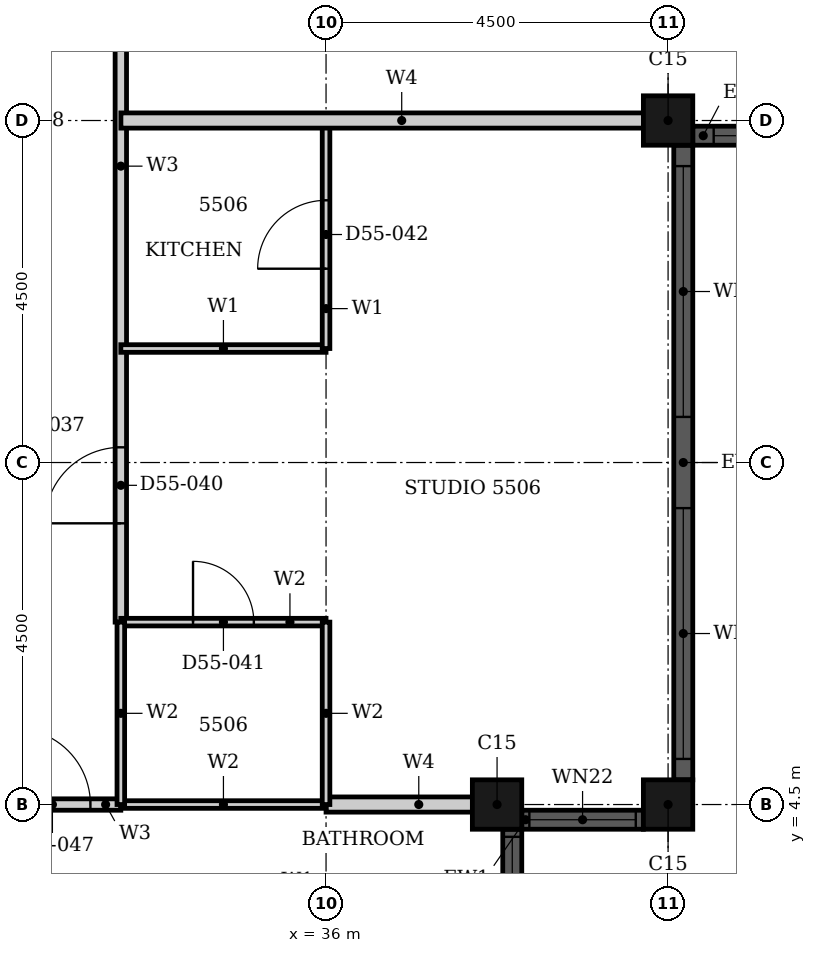
"""IFC4 building model, lengths in metres.
Left out: names, types, materials, properties, quantities, classifications, styles, units other than length and angle.
Written with IfcOpenShell. Run it as: python <this file> out.ifc"""

import sys

from ifc_helpers import new_model, si_unit, direction, frame, frame_2d, origin, origin_2d, place, context, subcontext, project, spatial, rectangle, hollow_rectangle, extrude, element, fill, save


model = new_model("IFC4")
c1 = context("Model", 3, precision=1e-05, world=origin(), true_north=direction((0.0, 1.0)))
c2 = subcontext(c1, "Body", "Model", "MODEL_VIEW")
j1 = project(units=[si_unit("LENGTHUNIT", "METRE"), si_unit("PLANEANGLEUNIT", "RADIAN")], contexts=[c1])
p1 = place(None, origin())
s1 = spatial("IfcSite", under=j1, at=p1, CompositionType="ELEMENT")
p2 = place(p1, origin())
s2 = spatial("IfcBuilding", under=s1, at=p2, CompositionType="ELEMENT")
p3 = place(p2, frame((0.0, 0.0, 218.3)))
s3 = spatial("IfcBuildingStorey", under=s2, at=p3, CompositionType="ELEMENT", Elevation=218.3)
for number, where, z_axis, x_axis in (
    (1, (40.5, 13.5, 0.0), (0.0, 0.0, 1.0), (1.0, 0.0, 0.0)),
    (2, (38.25, 4.5, 0.0), (0.0, 0.0, 1.0), (1.0, 0.0, 0.0)),
    (3, (40.5, 4.5, 0.0), (0.0, 0.0, 1.0), (1.0, 0.0, 0.0)),
):
    element("IfcColumn", number, at=place(p3, frame(where, z_axis=z_axis, x_axis=x_axis)), inside=s3, PredefinedType="COLUMN", context=c2, shape_type="SweptSolid", body=[
        extrude(hollow_rectangle(XDim=0.65, YDim=0.65, WallThickness=0.021, at=origin_2d()), origin(), (0.0, 0.0, 1.0), 3.7),
    ])
p4 = place(p3, frame((40.825, 13.3, 0.0), z_axis=(0.0, 0.0, 1.0), x_axis=(1.0, 0.0, 0.0)))
e4 = element("IfcWall", 4, at=p4, inside=s3, PredefinedType="SOLIDWALL", context=c2, shape_type="SweptSolid", body=[
    extrude(rectangle(XDim=3.85, YDim=0.25, at=frame_2d((1.925, 0.0))), origin(), (0.0, 0.0, 1.0), 3.7),
])
p5 = place(p4, frame((0.275, 0.0, 0.45)))
e5 = element("IfcOpeningElement", 5, at=p5, cuts=e4, PredefinedType="OPENING", context=c2, shape_type="SweptSolid", body=[
    extrude(rectangle(XDim=3.3, YDim=2.3, at=frame_2d((1.65, 1.15))), frame((0.0, 0.135, 0.0), z_axis=(0.0, -1.0, 0.0), x_axis=(1.0, 0.0, 0.0)), (0.0, 0.0, 1.0), 0.27),
])
p6 = place(p3, frame((38.45, 2.575, 0.0), z_axis=(0.0, 0.0, 1.0), x_axis=(0.0, 1.0, 0.0)))
e6 = element("IfcWall", 6, at=p6, inside=s3, PredefinedType="SOLIDWALL", context=c2, shape_type="SweptSolid", body=[
    extrude(rectangle(XDim=1.6, YDim=0.25, at=frame_2d((0.8, 0.0))), origin(), (0.0, 0.0, 1.0), 3.7),
])
p7 = place(p6, frame((0.1, 0.0, 0.9)))
e7 = element("IfcOpeningElement", 7, at=p7, cuts=e6, PredefinedType="OPENING", context=c2, shape_type="SweptSolid", body=[
    extrude(rectangle(XDim=1.4, YDim=1.85, at=frame_2d((0.7, 0.925))), frame((0.0, 0.135, 0.0), z_axis=(0.0, -1.0, 0.0), x_axis=(1.0, 0.0, 0.0)), (0.0, 0.0, 1.0), 0.27),
])
p8 = place(p3, frame((38.575, 4.3, 0.0), z_axis=(0.0, 0.0, 1.0), x_axis=(1.0, 0.0, 0.0)))
e8 = element("IfcWall", 8, at=p8, inside=s3, PredefinedType="SOLIDWALL", context=c2, shape_type="SweptSolid", body=[
    extrude(rectangle(XDim=1.6, YDim=0.25, at=frame_2d((0.8, 0.0))), origin(), (0.0, 0.0, 1.0), 3.7),
])
p9 = place(p8, frame((0.1, 0.0, 0.9)))
e9 = element("IfcOpeningElement", 9, at=p9, cuts=e8, PredefinedType="OPENING", context=c2, shape_type="SweptSolid", body=[
    extrude(rectangle(XDim=1.4, YDim=1.85, at=frame_2d((0.7, 0.925))), frame((0.0, 0.135, 0.0), z_axis=(0.0, -1.0, 0.0), x_axis=(1.0, 0.0, 0.0)), (0.0, 0.0, 1.0), 0.27),
])
p10 = place(p3, frame((40.7, 4.825, 0.0), z_axis=(0.0, 0.0, 1.0), x_axis=(0.0, 1.0, 0.0)))
e10 = element("IfcWall", 10, at=p10, inside=s3, PredefinedType="SOLIDWALL", context=c2, shape_type="SweptSolid", body=[
    extrude(rectangle(XDim=8.35, YDim=0.25, at=frame_2d((4.175, 0.0))), origin(), (0.0, 0.0, 1.0), 3.7),
])
p11 = place(p10, frame((0.275, 0.0, 0.45)))
e11 = element("IfcOpeningElement", 11, at=p11, cuts=e10, PredefinedType="OPENING", context=c2, shape_type="SweptSolid", body=[
    extrude(rectangle(XDim=3.3, YDim=2.3, at=frame_2d((1.65, 1.15))), frame((0.0, 0.135, 0.0), z_axis=(0.0, -1.0, 0.0), x_axis=(1.0, 0.0, 0.0)), (0.0, 0.0, 1.0), 0.27),
])
p12 = place(p10, frame((4.775, 0.0, 0.45)))
e12 = element("IfcOpeningElement", 12, at=p12, cuts=e10, PredefinedType="OPENING", context=c2, shape_type="SweptSolid", body=[
    extrude(rectangle(XDim=3.3, YDim=2.3, at=frame_2d((1.65, 1.15))), frame((0.0, 0.135, 0.0), z_axis=(0.0, -1.0, 0.0), x_axis=(1.0, 0.0, 0.0)), (0.0, 0.0, 1.0), 0.27),
])
p13 = place(p3, frame((31.5, 4.5, 0.0), z_axis=(0.0, 0.0, 1.0), x_axis=(1.0, 0.0, 0.0)))
e13 = element("IfcWall", 13, at=p13, inside=s3, PredefinedType="PARTITIONING", context=c2, shape_type="SweptSolid", body=[
    extrude(rectangle(XDim=1.8, YDim=0.15, at=frame_2d((0.9, 0.0))), origin(), (0.0, 0.0, 1.0), 3.4),
])
p14 = place(p13, frame((0.4, 0.0, 0.0)))
e14 = element("IfcOpeningElement", 14, at=p14, cuts=e13, PredefinedType="OPENING", context=c2, shape_type="SweptSolid", body=[
    extrude(rectangle(XDim=1.0, YDim=2.2, at=frame_2d((0.5, 1.1))), frame((0.0, 0.085, 0.0), z_axis=(0.0, -1.0, 0.0), x_axis=(1.0, 0.0, 0.0)), (0.0, 0.0, 1.0), 0.17),
])
p15 = place(p3, frame((33.3, 6.9, 0.0), z_axis=(0.0, 0.0, 1.0), x_axis=(0.0, 1.0, 0.0)))
e15 = element("IfcWall", 15, at=p15, inside=s3, PredefinedType="PARTITIONING", context=c2, shape_type="SweptSolid", body=[
    extrude(rectangle(XDim=13.799, YDim=0.15, at=frame_2d((6.899, 0.0))), origin(), (0.0, 0.0, 1.0), 3.4),
])
p16 = place(p15, frame((9.699, 0.0, 0.0)))
e16 = element("IfcOpeningElement", 16, at=p16, cuts=e15, PredefinedType="OPENING", context=c2, shape_type="SweptSolid", body=[
    extrude(rectangle(XDim=1.0, YDim=2.2, at=frame_2d((0.5, 1.1))), frame((0.0, 0.085, 0.0), z_axis=(0.0, -1.0, 0.0), x_axis=(1.0, 0.0, 0.0)), (0.0, 0.0, 1.0), 0.17),
])
p17 = place(p15, frame((1.3, 0.0, 0.0)))
e17 = element("IfcOpeningElement", 17, at=p17, cuts=e15, PredefinedType="OPENING", context=c2, shape_type="SweptSolid", body=[
    extrude(rectangle(XDim=1.0, YDim=2.2, at=frame_2d((0.5, 1.1))), frame((0.0, 0.085, 0.0), z_axis=(0.0, -1.0, 0.0), x_axis=(1.0, 0.0, 0.0)), (0.0, 0.0, 1.0), 0.17),
])
p18 = place(p3, frame((33.3, 10.5, 0.0), z_axis=(0.0, 0.0, 1.0), x_axis=(1.0, 0.0, 0.0)))
e18 = element("IfcWall", 18, at=p18, inside=s3, PredefinedType="PARTITIONING", context=c2, shape_type="SweptSolid", body=[
    extrude(rectangle(XDim=2.7, YDim=0.1, at=frame_2d((1.35, 0.0))), origin(), (0.0, 0.0, 1.0), 3.4),
])
p19 = place(p3, frame((36.0, 10.5, 0.0), z_axis=(0.0, 0.0, 1.0), x_axis=(0.0, 1.0, 0.0)))
e19 = element("IfcWall", 19, at=p19, inside=s3, PredefinedType="PARTITIONING", context=c2, shape_type="SweptSolid", body=[
    extrude(rectangle(XDim=3.0, YDim=0.1, at=frame_2d((1.5, 0.0))), origin(), (0.0, 0.0, 1.0), 2.68),
])
p20 = place(p19, frame((1.05, 0.0, 0.0)))
e20 = element("IfcOpeningElement", 20, at=p20, cuts=e19, PredefinedType="OPENING", context=c2, shape_type="SweptSolid", body=[
    extrude(rectangle(XDim=0.9, YDim=2.1, at=frame_2d((0.45, 1.05))), frame((0.0, 0.06, 0.0), z_axis=(0.0, -1.0, 0.0), x_axis=(1.0, 0.0, 0.0)), (0.0, 0.0, 1.0), 0.12),
])
p21 = place(p3, frame((33.301, 13.5, 0.0), z_axis=(0.0, 0.0, 1.0), x_axis=(1.0, 0.0, 0.0)))
e21 = element("IfcWall", 21, at=p21, inside=s3, PredefinedType="PARTITIONING", context=c2, shape_type="SweptSolid", body=[
    extrude(rectangle(XDim=7.389, YDim=0.2, at=frame_2d((3.694, 0.0))), origin(), (0.0, 0.0, 1.0), 2.48),
])
p22 = place(p3, frame((36.0, 4.5, 0.0), z_axis=(0.0, 0.0, 1.0), x_axis=(1.0, 0.0, 0.0)))
e22 = element("IfcWall", 22, at=p22, inside=s3, PredefinedType="PARTITIONING", context=c2, shape_type="SweptSolid", body=[
    extrude(rectangle(XDim=2.44, YDim=0.2, at=frame_2d((1.22, 0.0))), origin(), (0.0, 0.0, 1.0), 3.4),
])
p23 = place(p3, frame((33.3, 4.5, 0.0), z_axis=(0.0, 0.0, 1.0), x_axis=(1.0, 0.0, 0.0)))
e23 = element("IfcWall", 23, at=p23, inside=s3, PredefinedType="PARTITIONING", context=c2, shape_type="SweptSolid", body=[
    extrude(rectangle(XDim=2.7, YDim=0.1, at=frame_2d((1.35, 0.0))), origin(), (0.0, 0.0, 1.0), 3.4),
])
p24 = place(p3, frame((33.3, 6.9, 0.0), z_axis=(0.0, 0.0, 1.0), x_axis=(1.0, 0.0, 0.0)))
e24 = element("IfcWall", 24, at=p24, inside=s3, PredefinedType="PARTITIONING", context=c2, shape_type="SweptSolid", body=[
    extrude(rectangle(XDim=2.7, YDim=0.1, at=frame_2d((1.35, 0.0))), origin(), (0.0, 0.0, 1.0), 3.4),
])
p25 = place(p24, frame((0.95, 0.0, 0.0)))
e25 = element("IfcOpeningElement", 25, at=p25, cuts=e24, PredefinedType="OPENING", context=c2, shape_type="SweptSolid", body=[
    extrude(rectangle(XDim=0.8, YDim=2.1, at=frame_2d((0.4, 1.05))), frame((0.0, 0.06, 0.0), z_axis=(0.0, -1.0, 0.0), x_axis=(1.0, 0.0, 0.0)), (0.0, 0.0, 1.0), 0.12),
])
p26 = place(p3, frame((33.3, 4.5, 0.0), z_axis=(0.0, 0.0, 1.0), x_axis=(0.0, 1.0, 0.0)))
e26 = element("IfcWall", 26, at=p26, inside=s3, PredefinedType="PARTITIONING", context=c2, shape_type="SweptSolid", body=[
    extrude(rectangle(XDim=2.4, YDim=0.1, at=frame_2d((1.2, 0.0))), origin(), (0.0, 0.0, 1.0), 3.4),
])
p27 = place(p3, frame((36.0, 4.5, 0.0), z_axis=(0.0, 0.0, 1.0), x_axis=(0.0, 1.0, 0.0)))
e27 = element("IfcWall", 27, at=p27, inside=s3, PredefinedType="PARTITIONING", context=c2, shape_type="SweptSolid", body=[
    extrude(rectangle(XDim=2.4, YDim=0.1, at=frame_2d((1.2, 0.0))), origin(), (0.0, 0.0, 1.0), 2.68),
])
p28 = place(p5, origin())
e28 = element("IfcWindow", 28, at=p28, inside=s3, PartitioningType="SINGLE_PANEL", PredefinedType="WINDOW", context=c2, shape_type="SweptSolid", body=[
    extrude(rectangle(XDim=3.3, YDim=2.3, at=frame_2d((1.65, 1.15))), frame((0.0, 0.03, 0.0), z_axis=(0.0, -1.0, 0.0), x_axis=(1.0, 0.0, 0.0)), (0.0, 0.0, 1.0), 0.06),
])
fill(e5, e28)
p29 = place(p7, origin())
e29 = element("IfcWindow", 29, at=p29, inside=s3, PartitioningType="SINGLE_PANEL", PredefinedType="WINDOW", context=c2, shape_type="SweptSolid", body=[
    extrude(rectangle(XDim=1.4, YDim=1.85, at=frame_2d((0.7, 0.925))), frame((0.0, 0.03, 0.0), z_axis=(0.0, -1.0, 0.0), x_axis=(1.0, 0.0, 0.0)), (0.0, 0.0, 1.0), 0.06),
])
fill(e7, e29)
p30 = place(p9, origin())
e30 = element("IfcWindow", 30, at=p30, inside=s3, PartitioningType="SINGLE_PANEL", PredefinedType="WINDOW", context=c2, shape_type="SweptSolid", body=[
    extrude(rectangle(XDim=1.4, YDim=1.85, at=frame_2d((0.7, 0.925))), frame((0.0, 0.03, 0.0), z_axis=(0.0, -1.0, 0.0), x_axis=(1.0, 0.0, 0.0)), (0.0, 0.0, 1.0), 0.06),
])
fill(e9, e30)
p31 = place(p11, origin())
e31 = element("IfcWindow", 31, at=p31, inside=s3, PartitioningType="SINGLE_PANEL", PredefinedType="WINDOW", context=c2, shape_type="SweptSolid", body=[
    extrude(rectangle(XDim=3.3, YDim=2.3, at=frame_2d((1.65, 1.15))), frame((0.0, 0.03, 0.0), z_axis=(0.0, -1.0, 0.0), x_axis=(1.0, 0.0, 0.0)), (0.0, 0.0, 1.0), 0.06),
])
fill(e11, e31)
p32 = place(p12, origin())
e32 = element("IfcWindow", 32, at=p32, inside=s3, PartitioningType="SINGLE_PANEL", PredefinedType="WINDOW", context=c2, shape_type="SweptSolid", body=[
    extrude(rectangle(XDim=3.3, YDim=2.3, at=frame_2d((1.65, 1.15))), frame((0.0, 0.03, 0.0), z_axis=(0.0, -1.0, 0.0), x_axis=(1.0, 0.0, 0.0)), (0.0, 0.0, 1.0), 0.06),
])
fill(e12, e32)
p33 = place(p17, origin())
e33 = element("IfcDoor", 33, at=p33, inside=s3, OperationType="SINGLE_SWING_LEFT", PredefinedType="DOOR", context=c2, shape_type="SweptSolid", body=[
    extrude(rectangle(XDim=1.0, YDim=2.2, at=frame_2d((0.5, 1.1))), frame((0.0, 0.025, 0.0), z_axis=(0.0, -1.0, 0.0), x_axis=(1.0, 0.0, 0.0)), (0.0, 0.0, 1.0), 0.05),
])
fill(e17, e33)
p34 = place(p25, origin())
e34 = element("IfcDoor", 34, at=p34, inside=s3, OperationType="SINGLE_SWING_RIGHT", PredefinedType="DOOR", context=c2, shape_type="SweptSolid", body=[
    extrude(rectangle(XDim=0.8, YDim=2.1, at=frame_2d((0.4, 1.05))), frame((0.0, 0.025, 0.0), z_axis=(0.0, -1.0, 0.0), x_axis=(1.0, 0.0, 0.0)), (0.0, 0.0, 1.0), 0.05),
])
fill(e25, e34)
p35 = place(p20, origin())
e35 = element("IfcDoor", 35, at=p35, inside=s3, OperationType="SINGLE_SWING_RIGHT", PredefinedType="DOOR", context=c2, shape_type="SweptSolid", body=[
    extrude(rectangle(XDim=0.9, YDim=2.1, at=frame_2d((0.45, 1.05))), frame((0.0, 0.025, 0.0), z_axis=(0.0, -1.0, 0.0), x_axis=(1.0, 0.0, 0.0)), (0.0, 0.0, 1.0), 0.05),
])
fill(e20, e35)
p36 = place(p14, origin())
e36 = element("IfcDoor", 36, at=p36, inside=s3, OperationType="SINGLE_SWING_LEFT", PredefinedType="DOOR", context=c2, shape_type="SweptSolid", body=[
    extrude(rectangle(XDim=1.0, YDim=2.2, at=frame_2d((0.5, 1.1))), frame((0.0, 0.025, 0.0), z_axis=(0.0, -1.0, 0.0), x_axis=(1.0, 0.0, 0.0)), (0.0, 0.0, 1.0), 0.05),
])
fill(e14, e36)
save(model, sys.argv[1])
